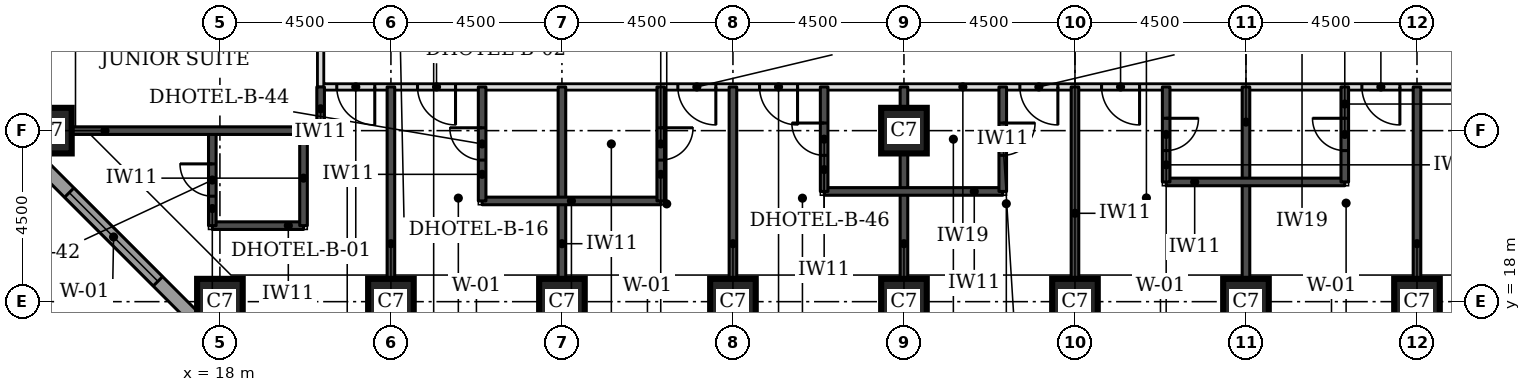
"""IFC4 building model, lengths in metres.
Left out: names, types, materials, properties, quantities, classifications, styles, units other than length and angle.
Written with IfcOpenShell. Run it as: python <this file> out.ifc"""

import sys

from ifc_helpers import new_model, si_unit, direction, frame, frame_2d, origin, origin_2d, place, context, subcontext, project, spatial, rectangle, extrude, element, fill, save


model = new_model("IFC4")
c1 = context("Model", 3, precision=1e-05, world=origin(), true_north=direction((0.0, 1.0)))
c2 = subcontext(c1, "Body", "Model", "MODEL_VIEW")
j1 = project(units=[si_unit("LENGTHUNIT", "METRE"), si_unit("PLANEANGLEUNIT", "RADIAN")], contexts=[c1])
p1 = place(None, origin())
s1 = spatial("IfcSite", under=j1, at=p1, CompositionType="ELEMENT")
p2 = place(p1, origin())
s2 = spatial("IfcBuilding", under=s1, at=p2, CompositionType="ELEMENT")
p3 = place(p2, frame((0.0, 0.0, 29.7)))
s3 = spatial("IfcBuildingStorey", under=s2, at=p3, CompositionType="ELEMENT", Elevation=29.7)
for number, where, z_axis, x_axis in (
    (1, (18.0, 18.0, 0.0), (0.0, 0.0, 1.0), (1.0, 0.0, 0.0)),
    (2, (22.5, 18.0, 0.0), (0.0, 0.0, 1.0), (1.0, 0.0, 0.0)),
    (3, (27.0, 18.0, 0.0), (0.0, 0.0, 1.0), (1.0, 0.0, 0.0)),
    (4, (31.5, 18.0, 0.0), (0.0, 0.0, 1.0), (1.0, 0.0, 0.0)),
    (5, (36.0, 18.0, 0.0), (0.0, 0.0, 1.0), (1.0, 0.0, 0.0)),
    (6, (40.5, 18.0, 0.0), (0.0, 0.0, 1.0), (1.0, 0.0, 0.0)),
    (7, (45.0, 18.0, 0.0), (0.0, 0.0, 1.0), (1.0, 0.0, 0.0)),
    (8, (49.5, 18.0, 0.0), (0.0, 0.0, 1.0), (1.0, 0.0, 0.0)),
    (9, (13.5, 22.5, 0.0), (0.0, 0.0, 1.0), (1.0, 0.0, 0.0)),
    (10, (36.0, 22.5, 0.0), (0.0, 0.0, 1.0), (1.0, 0.0, 0.0)),
):
    element("IfcColumn", number, at=place(p3, frame(where, z_axis=z_axis, x_axis=x_axis)), inside=s3, PredefinedType="COLUMN", context=c2, shape_type="SweptSolid", body=[
        extrude(rectangle(XDim=1.2, YDim=1.2, at=origin_2d()), origin(), (0.0, 0.0, 1.0), 3.3),
    ])
p4 = place(p3, frame((12.674, 22.23, 0.0), z_axis=(0.0, 0.0, 1.0), x_axis=(0.707106781187, -0.707106781187, 0.0)))
e11 = element("IfcWall", 11, at=p4, inside=s3, PredefinedType="STANDARD", context=c2, shape_type="SweptSolid", body=[
    extrude(rectangle(XDim=7.151, YDim=0.35, at=frame_2d((3.576, 0.0))), origin(), (0.0, 0.0, 1.0), 3.055),
])
p5 = place(p4, frame((1.926, 0.0, 0.8)))
e12 = element("IfcOpeningElement", 12, at=p5, cuts=e11, PredefinedType="OPENING", context=c2, shape_type="SweptSolid", body=[
    extrude(rectangle(XDim=3.3, YDim=1.5, at=frame_2d((1.65, 0.75))), frame((0.0, 0.185, 0.0), z_axis=(0.0, -1.0, 0.0), x_axis=(1.0, 0.0, 0.0)), (0.0, 0.0, 1.0), 0.37),
])
p6 = place(p3, frame((20.65, 23.65, 0.0), z_axis=(0.0, 0.0, 1.0), x_axis=(1.0, 0.0, 0.0)))
e13 = element("IfcWall", 13, at=p6, inside=s3, PredefinedType="PARTITIONING", context=c2, shape_type="SweptSolid", body=[
    extrude(rectangle(XDim=32.2, YDim=0.15, at=frame_2d((16.1, 0.0))), origin(), (0.0, 0.0, 1.0), 3.08),
])
p7 = place(p6, frame((2.55, 0.0, 0.0)))
e14 = element("IfcOpeningElement", 14, at=p7, cuts=e13, PredefinedType="OPENING", context=c2, shape_type="SweptSolid", body=[
    extrude(rectangle(XDim=1.0, YDim=2.1, at=frame_2d((0.5, 1.05))), frame((0.0, 0.085, 0.0), z_axis=(0.0, -1.0, 0.0), x_axis=(1.0, 0.0, 0.0)), (0.0, 0.0, 1.0), 0.17),
])
p8 = place(p6, frame((9.4, 0.0, 0.0)))
e15 = element("IfcOpeningElement", 15, at=p8, cuts=e13, PredefinedType="OPENING", context=c2, shape_type="SweptSolid", body=[
    extrude(rectangle(XDim=1.0, YDim=2.1, at=frame_2d((0.5, 1.05))), frame((0.0, 0.085, 0.0), z_axis=(0.0, -1.0, 0.0), x_axis=(1.0, 0.0, 0.0)), (0.0, 0.0, 1.0), 0.17),
])
p9 = place(p6, frame((11.55, 0.0, 0.0)))
e16 = element("IfcOpeningElement", 16, at=p9, cuts=e13, PredefinedType="OPENING", context=c2, shape_type="SweptSolid", body=[
    extrude(rectangle(XDim=1.0, YDim=2.1, at=frame_2d((0.5, 1.05))), frame((0.0, 0.085, 0.0), z_axis=(0.0, -1.0, 0.0), x_axis=(1.0, 0.0, 0.0)), (0.0, 0.0, 1.0), 0.17),
])
p10 = place(p6, frame((18.4, 0.0, 0.0)))
e17 = element("IfcOpeningElement", 17, at=p10, cuts=e13, PredefinedType="OPENING", context=c2, shape_type="SweptSolid", body=[
    extrude(rectangle(XDim=1.0, YDim=2.1, at=frame_2d((0.5, 1.05))), frame((0.0, 0.085, 0.0), z_axis=(0.0, -1.0, 0.0), x_axis=(1.0, 0.0, 0.0)), (0.0, 0.0, 1.0), 0.17),
])
p11 = place(p6, frame((20.55, 0.0, 0.0)))
e18 = element("IfcOpeningElement", 18, at=p11, cuts=e13, PredefinedType="OPENING", context=c2, shape_type="SweptSolid", body=[
    extrude(rectangle(XDim=1.0, YDim=2.1, at=frame_2d((0.5, 1.05))), frame((0.0, 0.085, 0.0), z_axis=(0.0, -1.0, 0.0), x_axis=(1.0, 0.0, 0.0)), (0.0, 0.0, 1.0), 0.17),
])
p12 = place(p6, frame((27.4, 0.0, 0.0)))
e19 = element("IfcOpeningElement", 19, at=p12, cuts=e13, PredefinedType="OPENING", context=c2, shape_type="SweptSolid", body=[
    extrude(rectangle(XDim=1.0, YDim=2.1, at=frame_2d((0.5, 1.05))), frame((0.0, 0.085, 0.0), z_axis=(0.0, -1.0, 0.0), x_axis=(1.0, 0.0, 0.0)), (0.0, 0.0, 1.0), 0.17),
])
p13 = place(p6, frame((0.425, 0.0, 0.0)))
e20 = element("IfcOpeningElement", 20, at=p13, cuts=e13, PredefinedType="OPENING", context=c2, shape_type="SweptSolid", body=[
    extrude(rectangle(XDim=1.0, YDim=2.1, at=frame_2d((0.5, 1.05))), frame((0.0, 0.085, 0.0), z_axis=(0.0, -1.0, 0.0), x_axis=(1.0, 0.0, 0.0)), (0.0, 0.0, 1.0), 0.17),
])
p14 = place(p6, frame((30.025, 0.0, 0.0)))
e21 = element("IfcOpeningElement", 21, at=p14, cuts=e13, PredefinedType="OPENING", context=c2, shape_type="SweptSolid", body=[
    extrude(rectangle(XDim=1.0, YDim=2.1, at=frame_2d((0.5, 1.05))), frame((0.0, 0.085, 0.0), z_axis=(0.0, -1.0, 0.0), x_axis=(1.0, 0.0, 0.0)), (0.0, 0.0, 1.0), 0.17),
])
p15 = place(p3, frame((20.65, 23.65, 0.0), z_axis=(0.0, 0.0, 1.0), x_axis=(0.0, 1.0, 0.0)))
e22 = element("IfcWall", 22, at=p15, inside=s3, PredefinedType="PARTITIONING", context=c2, shape_type="SweptSolid", body=[
    extrude(rectangle(XDim=25.85, YDim=0.15, at=frame_2d((12.925, 0.0))), origin(), (0.0, 0.0, 1.0), 3.08),
])
p16 = place(p15, frame((1.5, 0.0, 0.0)))
e23 = element("IfcOpeningElement", 23, at=p16, cuts=e22, PredefinedType="OPENING", context=c2, shape_type="SweptSolid", body=[
    extrude(rectangle(XDim=1.0, YDim=2.1, at=frame_2d((0.5, 1.05))), frame((0.0, 0.085, 0.0), z_axis=(0.0, -1.0, 0.0), x_axis=(1.0, 0.0, 0.0)), (0.0, 0.0, 1.0), 0.17),
])
p17 = place(p15, frame((13.45, 0.0, 0.0)))
e24 = element("IfcOpeningElement", 24, at=p17, cuts=e22, PredefinedType="OPENING", context=c2, shape_type="SweptSolid", body=[
    extrude(rectangle(XDim=1.0, YDim=2.1, at=frame_2d((0.5, 1.05))), frame((0.0, 0.085, 0.0), z_axis=(0.0, -1.0, 0.0), x_axis=(1.0, 0.0, 0.0)), (0.0, 0.0, 1.0), 0.17),
])
p18 = place(p15, frame((19.5, 0.0, 0.0)))
e25 = element("IfcOpeningElement", 25, at=p18, cuts=e22, PredefinedType="OPENING", context=c2, shape_type="SweptSolid", body=[
    extrude(rectangle(XDim=1.0, YDim=2.1, at=frame_2d((0.5, 1.05))), frame((0.0, 0.085, 0.0), z_axis=(0.0, -1.0, 0.0), x_axis=(1.0, 0.0, 0.0)), (0.0, 0.0, 1.0), 0.17),
])
for number, where, z_axis, x_axis in (
    (26, (22.5, 18.6, 0.0), (0.0, 0.0, 1.0), (0.0, 1.0, 0.0)),
    (27, (27.0, 18.6, 0.0), (0.0, 0.0, 1.0), (0.0, 1.0, 0.0)),
    (28, (31.5, 18.6, 0.0), (0.0, 0.0, 1.0), (0.0, 1.0, 0.0)),
    (29, (36.0, 18.6, 0.0), (0.0, 0.0, 1.0), (0.0, 1.0, 0.0)),
    (30, (40.5, 18.6, 0.0), (0.0, 0.0, 1.0), (0.0, 1.0, 0.0)),
    (31, (45.0, 18.6, 0.0), (0.0, 0.0, 1.0), (0.0, 1.0, 0.0)),
    (32, (49.5, 18.6, 0.0), (0.0, 0.0, 1.0), (0.0, 1.0, 0.0)),
):
    element("IfcWall", number, at=place(p3, frame(where, z_axis=z_axis, x_axis=x_axis)), inside=s3, PredefinedType="SOLIDWALL", context=c2, shape_type="SweptSolid", body=[
        extrude(rectangle(XDim=5.05, YDim=0.2, at=frame_2d((2.525, 0.0))), origin(), (0.0, 0.0, 1.0), 3.08),
    ])
p19 = place(p3, frame((17.8, 20.0, 0.0), z_axis=(0.0, 0.0, 1.0), x_axis=(1.0, 0.0, 0.0)))
e33 = element("IfcWall", 33, at=p19, inside=s3, PredefinedType="SOLIDWALL", context=c2, shape_type="SweptSolid", body=[
    extrude(rectangle(XDim=2.4, YDim=0.2, at=frame_2d((1.2, 0.0))), origin(), (0.0, 0.0, 1.0), 3.08),
])
p20 = place(p3, frame((17.8, 20.0, 0.0), z_axis=(0.0, 0.0, 1.0), x_axis=(0.0, 1.0, 0.0)))
e34 = element("IfcWall", 34, at=p20, inside=s3, PredefinedType="SOLIDWALL", context=c2, shape_type="SweptSolid", body=[
    extrude(rectangle(XDim=2.5, YDim=0.2, at=frame_2d((1.25, 0.0))), origin(), (0.0, 0.0, 1.0), 3.08),
])
p21 = place(p20, frame((0.775, 0.0, 0.0)))
e35 = element("IfcOpeningElement", 35, at=p21, cuts=e34, PredefinedType="OPENING", context=c2, shape_type="SweptSolid", body=[
    extrude(rectangle(XDim=0.85, YDim=2.1, at=frame_2d((0.425, 1.05))), frame((0.0, 0.11, 0.0), z_axis=(0.0, -1.0, 0.0), x_axis=(1.0, 0.0, 0.0)), (0.0, 0.0, 1.0), 0.22),
])
p22 = place(p3, frame((20.2, 20.0, 0.0), z_axis=(0.0, 0.0, 1.0), x_axis=(0.0, 1.0, 0.0)))
e36 = element("IfcWall", 36, at=p22, inside=s3, PredefinedType="SOLIDWALL", context=c2, shape_type="SweptSolid", body=[
    extrude(rectangle(XDim=2.5, YDim=0.2, at=frame_2d((1.25, 0.0))), origin(), (0.0, 0.0, 1.0), 3.08),
])
p23 = place(p3, frame((24.9, 20.65, 0.0), z_axis=(0.0, 0.0, 1.0), x_axis=(1.0, 0.0, 0.0)))
e37 = element("IfcWall", 37, at=p23, inside=s3, PredefinedType="SOLIDWALL", context=c2, shape_type="SweptSolid", body=[
    extrude(rectangle(XDim=4.7, YDim=0.2, at=frame_2d((2.35, 0.0))), origin(), (0.0, 0.0, 1.0), 3.08),
])
p24 = place(p3, frame((24.9, 20.65, 0.0), z_axis=(0.0, 0.0, 1.0), x_axis=(0.0, 1.0, 0.0)))
e38 = element("IfcWall", 38, at=p24, inside=s3, PredefinedType="SOLIDWALL", context=c2, shape_type="SweptSolid", body=[
    extrude(rectangle(XDim=3.0, YDim=0.2, at=frame_2d((1.5, 0.0))), origin(), (0.0, 0.0, 1.0), 3.08),
])
p25 = place(p24, frame((1.075, 0.0, 0.0)))
e39 = element("IfcOpeningElement", 39, at=p25, cuts=e38, PredefinedType="OPENING", context=c2, shape_type="SweptSolid", body=[
    extrude(rectangle(XDim=0.85, YDim=2.1, at=frame_2d((0.425, 1.05))), frame((0.0, 0.11, 0.0), z_axis=(0.0, -1.0, 0.0), x_axis=(1.0, 0.0, 0.0)), (0.0, 0.0, 1.0), 0.22),
])
p26 = place(p3, frame((29.6, 20.65, 0.0), z_axis=(0.0, 0.0, 1.0), x_axis=(0.0, 1.0, 0.0)))
e40 = element("IfcWall", 40, at=p26, inside=s3, PredefinedType="SOLIDWALL", context=c2, shape_type="SweptSolid", body=[
    extrude(rectangle(XDim=3.0, YDim=0.2, at=frame_2d((1.5, 0.0))), origin(), (0.0, 0.0, 1.0), 3.08),
])
p27 = place(p26, frame((1.075, 0.0, 0.0)))
e41 = element("IfcOpeningElement", 41, at=p27, cuts=e40, PredefinedType="OPENING", context=c2, shape_type="SweptSolid", body=[
    extrude(rectangle(XDim=0.85, YDim=2.1, at=frame_2d((0.425, 1.05))), frame((0.0, 0.11, 0.0), z_axis=(0.0, -1.0, 0.0), x_axis=(1.0, 0.0, 0.0)), (0.0, 0.0, 1.0), 0.22),
])
p28 = place(p3, frame((33.9, 20.9, 0.0), z_axis=(0.0, 0.0, 1.0), x_axis=(1.0, 0.0, 0.0)))
e42 = element("IfcWall", 42, at=p28, inside=s3, PredefinedType="SOLIDWALL", context=c2, shape_type="SweptSolid", body=[
    extrude(rectangle(XDim=4.7, YDim=0.2, at=frame_2d((2.35, 0.0))), origin(), (0.0, 0.0, 1.0), 3.08),
])
p29 = place(p3, frame((33.9, 20.9, 0.0), z_axis=(0.0, 0.0, 1.0), x_axis=(0.0, 1.0, 0.0)))
e43 = element("IfcWall", 43, at=p29, inside=s3, PredefinedType="SOLIDWALL", context=c2, shape_type="SweptSolid", body=[
    extrude(rectangle(XDim=2.75, YDim=0.2, at=frame_2d((1.375, 0.0))), origin(), (0.0, 0.0, 1.0), 3.08),
])
p30 = place(p29, frame((0.95, 0.0, 0.0)))
e44 = element("IfcOpeningElement", 44, at=p30, cuts=e43, PredefinedType="OPENING", context=c2, shape_type="SweptSolid", body=[
    extrude(rectangle(XDim=0.85, YDim=2.1, at=frame_2d((0.425, 1.05))), frame((0.0, 0.11, 0.0), z_axis=(0.0, -1.0, 0.0), x_axis=(1.0, 0.0, 0.0)), (0.0, 0.0, 1.0), 0.22),
])
p31 = place(p3, frame((38.6, 20.9, 0.0), z_axis=(0.0, 0.0, 1.0), x_axis=(0.0, 1.0, 0.0)))
e45 = element("IfcWall", 45, at=p31, inside=s3, PredefinedType="SOLIDWALL", context=c2, shape_type="SweptSolid", body=[
    extrude(rectangle(XDim=2.75, YDim=0.2, at=frame_2d((1.375, 0.0))), origin(), (0.0, 0.0, 1.0), 3.08),
])
p32 = place(p31, frame((0.95, 0.0, 0.0)))
e46 = element("IfcOpeningElement", 46, at=p32, cuts=e45, PredefinedType="OPENING", context=c2, shape_type="SweptSolid", body=[
    extrude(rectangle(XDim=0.85, YDim=2.1, at=frame_2d((0.425, 1.05))), frame((0.0, 0.11, 0.0), z_axis=(0.0, -1.0, 0.0), x_axis=(1.0, 0.0, 0.0)), (0.0, 0.0, 1.0), 0.22),
])
p33 = place(p3, frame((42.9, 21.15, 0.0), z_axis=(0.0, 0.0, 1.0), x_axis=(1.0, 0.0, 0.0)))
e47 = element("IfcWall", 47, at=p33, inside=s3, PredefinedType="SOLIDWALL", context=c2, shape_type="SweptSolid", body=[
    extrude(rectangle(XDim=4.7, YDim=0.2, at=frame_2d((2.35, 0.0))), origin(), (0.0, 0.0, 1.0), 3.08),
])
p34 = place(p3, frame((42.9, 21.15, 0.0), z_axis=(0.0, 0.0, 1.0), x_axis=(0.0, 1.0, 0.0)))
e48 = element("IfcWall", 48, at=p34, inside=s3, PredefinedType="SOLIDWALL", context=c2, shape_type="SweptSolid", body=[
    extrude(rectangle(XDim=2.5, YDim=0.2, at=frame_2d((1.25, 0.0))), origin(), (0.0, 0.0, 1.0), 3.08),
])
p35 = place(p34, frame((0.825, 0.0, 0.0)))
e49 = element("IfcOpeningElement", 49, at=p35, cuts=e48, PredefinedType="OPENING", context=c2, shape_type="SweptSolid", body=[
    extrude(rectangle(XDim=0.85, YDim=2.1, at=frame_2d((0.425, 1.05))), frame((0.0, 0.11, 0.0), z_axis=(0.0, -1.0, 0.0), x_axis=(1.0, 0.0, 0.0)), (0.0, 0.0, 1.0), 0.22),
])
p36 = place(p3, frame((47.6, 21.15, 0.0), z_axis=(0.0, 0.0, 1.0), x_axis=(0.0, 1.0, 0.0)))
e50 = element("IfcWall", 50, at=p36, inside=s3, PredefinedType="SOLIDWALL", context=c2, shape_type="SweptSolid", body=[
    extrude(rectangle(XDim=2.5, YDim=0.2, at=frame_2d((1.25, 0.0))), origin(), (0.0, 0.0, 1.0), 3.08),
])
p37 = place(p36, frame((0.825, 0.0, 0.0)))
e51 = element("IfcOpeningElement", 51, at=p37, cuts=e50, PredefinedType="OPENING", context=c2, shape_type="SweptSolid", body=[
    extrude(rectangle(XDim=0.85, YDim=2.1, at=frame_2d((0.425, 1.05))), frame((0.0, 0.11, 0.0), z_axis=(0.0, -1.0, 0.0), x_axis=(1.0, 0.0, 0.0)), (0.0, 0.0, 1.0), 0.22),
])
p38 = place(p3, frame((14.1, 22.5, 0.0), z_axis=(0.0, 0.0, 1.0), x_axis=(1.0, 0.0, 0.0)))
e52 = element("IfcWall", 52, at=p38, inside=s3, PredefinedType="SOLIDWALL", context=c2, shape_type="SweptSolid", body=[
    extrude(rectangle(XDim=6.55, YDim=0.2, at=frame_2d((3.275, 0.0))), origin(), (0.0, 0.0, 1.0), 3.08),
])
p39 = place(p3, frame((20.65, 22.5, 0.0), z_axis=(0.0, 0.0, 1.0), x_axis=(0.0, 1.0, 0.0)))
e53 = element("IfcWall", 53, at=p39, inside=s3, PredefinedType="SOLIDWALL", context=c2, shape_type="SweptSolid", body=[
    extrude(rectangle(XDim=1.15, YDim=0.2, at=frame_2d((0.575, 0.0))), origin(), (0.0, 0.0, 1.0), 3.08),
])
p40 = place(p5, origin())
e54 = element("IfcWindow", 54, at=p40, inside=s3, PartitioningType="SINGLE_PANEL", PredefinedType="WINDOW", context=c2, shape_type="SweptSolid", body=[
    extrude(rectangle(XDim=3.3, YDim=1.5, at=frame_2d((1.65, 0.75))), frame((0.0, 0.085, 0.0), z_axis=(0.0, -1.0, 0.0), x_axis=(1.0, 0.0, 0.0)), (0.0, 0.0, 1.0), 0.06),
])
fill(e12, e54)
p41 = place(p7, frame((1.0, 0.0, 0.0), z_axis=(0.0, 0.0, 1.0), x_axis=(-1.0, 0.0, 0.0)))
e55 = element("IfcDoor", 55, at=p41, inside=s3, OperationType="SINGLE_SWING_LEFT", PredefinedType="DOOR", context=c2, shape_type="SweptSolid", body=[
    extrude(rectangle(XDim=1.0, YDim=2.1, at=frame_2d((0.5, 1.05))), frame((0.0, 0.025, 0.0), z_axis=(0.0, -1.0, 0.0), x_axis=(1.0, 0.0, 0.0)), (0.0, 0.0, 1.0), 0.05),
])
fill(e14, e55)
p42 = place(p25, origin())
e56 = element("IfcDoor", 56, at=p42, inside=s3, OperationType="SINGLE_SWING_RIGHT", PredefinedType="DOOR", context=c2, shape_type="SweptSolid", body=[
    extrude(rectangle(XDim=0.85, YDim=2.1, at=frame_2d((0.425, 1.05))), frame((0.0, 0.025, 0.0), z_axis=(0.0, -1.0, 0.0), x_axis=(1.0, 0.0, 0.0)), (0.0, 0.0, 1.0), 0.05),
])
fill(e39, e56)
p43 = place(p8, frame((1.0, 0.0, 0.0), z_axis=(0.0, 0.0, 1.0), x_axis=(-1.0, 0.0, 0.0)))
e57 = element("IfcDoor", 57, at=p43, inside=s3, OperationType="SINGLE_SWING_LEFT", PredefinedType="DOOR", context=c2, shape_type="SweptSolid", body=[
    extrude(rectangle(XDim=1.0, YDim=2.1, at=frame_2d((0.5, 1.05))), frame((0.0, 0.025, 0.0), z_axis=(0.0, -1.0, 0.0), x_axis=(1.0, 0.0, 0.0)), (0.0, 0.0, 1.0), 0.05),
])
fill(e15, e57)
p44 = place(p27, frame((0.85, 0.0, 0.0), z_axis=(0.0, 0.0, 1.0), x_axis=(-1.0, 0.0, 0.0)))
e58 = element("IfcDoor", 58, at=p44, inside=s3, OperationType="SINGLE_SWING_LEFT", PredefinedType="DOOR", context=c2, shape_type="SweptSolid", body=[
    extrude(rectangle(XDim=0.85, YDim=2.1, at=frame_2d((0.425, 1.05))), frame((0.0, 0.025, 0.0), z_axis=(0.0, -1.0, 0.0), x_axis=(1.0, 0.0, 0.0)), (0.0, 0.0, 1.0), 0.05),
])
fill(e41, e58)
p45 = place(p9, frame((1.0, 0.0, 0.0), z_axis=(0.0, 0.0, 1.0), x_axis=(-1.0, 0.0, 0.0)))
e59 = element("IfcDoor", 59, at=p45, inside=s3, OperationType="SINGLE_SWING_LEFT", PredefinedType="DOOR", context=c2, shape_type="SweptSolid", body=[
    extrude(rectangle(XDim=1.0, YDim=2.1, at=frame_2d((0.5, 1.05))), frame((0.0, 0.025, 0.0), z_axis=(0.0, -1.0, 0.0), x_axis=(1.0, 0.0, 0.0)), (0.0, 0.0, 1.0), 0.05),
])
fill(e16, e59)
p46 = place(p30, origin())
e60 = element("IfcDoor", 60, at=p46, inside=s3, OperationType="SINGLE_SWING_RIGHT", PredefinedType="DOOR", context=c2, shape_type="SweptSolid", body=[
    extrude(rectangle(XDim=0.85, YDim=2.1, at=frame_2d((0.425, 1.05))), frame((0.0, 0.025, 0.0), z_axis=(0.0, -1.0, 0.0), x_axis=(1.0, 0.0, 0.0)), (0.0, 0.0, 1.0), 0.05),
])
fill(e44, e60)
p47 = place(p10, frame((1.0, 0.0, 0.0), z_axis=(0.0, 0.0, 1.0), x_axis=(-1.0, 0.0, 0.0)))
e61 = element("IfcDoor", 61, at=p47, inside=s3, OperationType="SINGLE_SWING_LEFT", PredefinedType="DOOR", context=c2, shape_type="SweptSolid", body=[
    extrude(rectangle(XDim=1.0, YDim=2.1, at=frame_2d((0.5, 1.05))), frame((0.0, 0.025, 0.0), z_axis=(0.0, -1.0, 0.0), x_axis=(1.0, 0.0, 0.0)), (0.0, 0.0, 1.0), 0.05),
])
fill(e17, e61)
p48 = place(p32, frame((0.85, 0.0, 0.0), z_axis=(0.0, 0.0, 1.0), x_axis=(-1.0, 0.0, 0.0)))
e62 = element("IfcDoor", 62, at=p48, inside=s3, OperationType="SINGLE_SWING_LEFT", PredefinedType="DOOR", context=c2, shape_type="SweptSolid", body=[
    extrude(rectangle(XDim=0.85, YDim=2.1, at=frame_2d((0.425, 1.05))), frame((0.0, 0.025, 0.0), z_axis=(0.0, -1.0, 0.0), x_axis=(1.0, 0.0, 0.0)), (0.0, 0.0, 1.0), 0.05),
])
fill(e46, e62)
p49 = place(p11, frame((1.0, 0.0, 0.0), z_axis=(0.0, 0.0, 1.0), x_axis=(-1.0, 0.0, 0.0)))
e63 = element("IfcDoor", 63, at=p49, inside=s3, OperationType="SINGLE_SWING_LEFT", PredefinedType="DOOR", context=c2, shape_type="SweptSolid", body=[
    extrude(rectangle(XDim=1.0, YDim=2.1, at=frame_2d((0.5, 1.05))), frame((0.0, 0.025, 0.0), z_axis=(0.0, -1.0, 0.0), x_axis=(1.0, 0.0, 0.0)), (0.0, 0.0, 1.0), 0.05),
])
fill(e18, e63)
p50 = place(p35, frame((0.85, 0.0, 0.0), z_axis=(0.0, 0.0, 1.0), x_axis=(-1.0, 0.0, 0.0)))
e64 = element("IfcDoor", 64, at=p50, inside=s3, OperationType="SINGLE_SWING_LEFT", PredefinedType="DOOR", context=c2, shape_type="SweptSolid", body=[
    extrude(rectangle(XDim=0.85, YDim=2.1, at=frame_2d((0.425, 1.05))), frame((0.0, 0.025, 0.0), z_axis=(0.0, -1.0, 0.0), x_axis=(1.0, 0.0, 0.0)), (0.0, 0.0, 1.0), 0.05),
])
fill(e49, e64)
p51 = place(p12, frame((1.0, 0.0, 0.0), z_axis=(0.0, 0.0, 1.0), x_axis=(-1.0, 0.0, 0.0)))
e65 = element("IfcDoor", 65, at=p51, inside=s3, OperationType="SINGLE_SWING_LEFT", PredefinedType="DOOR", context=c2, shape_type="SweptSolid", body=[
    extrude(rectangle(XDim=1.0, YDim=2.1, at=frame_2d((0.5, 1.05))), frame((0.0, 0.025, 0.0), z_axis=(0.0, -1.0, 0.0), x_axis=(1.0, 0.0, 0.0)), (0.0, 0.0, 1.0), 0.05),
])
fill(e19, e65)
p52 = place(p37, origin())
e66 = element("IfcDoor", 66, at=p52, inside=s3, OperationType="SINGLE_SWING_RIGHT", PredefinedType="DOOR", context=c2, shape_type="SweptSolid", body=[
    extrude(rectangle(XDim=0.85, YDim=2.1, at=frame_2d((0.425, 1.05))), frame((0.0, 0.025, 0.0), z_axis=(0.0, -1.0, 0.0), x_axis=(1.0, 0.0, 0.0)), (0.0, 0.0, 1.0), 0.05),
])
fill(e51, e66)
p53 = place(p13, frame((1.0, 0.0, 0.0), z_axis=(0.0, 0.0, 1.0), x_axis=(-1.0, 0.0, 0.0)))
e67 = element("IfcDoor", 67, at=p53, inside=s3, OperationType="SINGLE_SWING_LEFT", PredefinedType="DOOR", context=c2, shape_type="SweptSolid", body=[
    extrude(rectangle(XDim=1.0, YDim=2.1, at=frame_2d((0.5, 1.05))), frame((0.0, 0.025, 0.0), z_axis=(0.0, -1.0, 0.0), x_axis=(1.0, 0.0, 0.0)), (0.0, 0.0, 1.0), 0.05),
])
fill(e20, e67)
p54 = place(p21, origin())
e68 = element("IfcDoor", 68, at=p54, inside=s3, OperationType="SINGLE_SWING_RIGHT", PredefinedType="DOOR", context=c2, shape_type="SweptSolid", body=[
    extrude(rectangle(XDim=0.85, YDim=2.1, at=frame_2d((0.425, 1.05))), frame((0.0, 0.025, 0.0), z_axis=(0.0, -1.0, 0.0), x_axis=(1.0, 0.0, 0.0)), (0.0, 0.0, 1.0), 0.05),
])
fill(e35, e68)
save(model, sys.argv[1])
